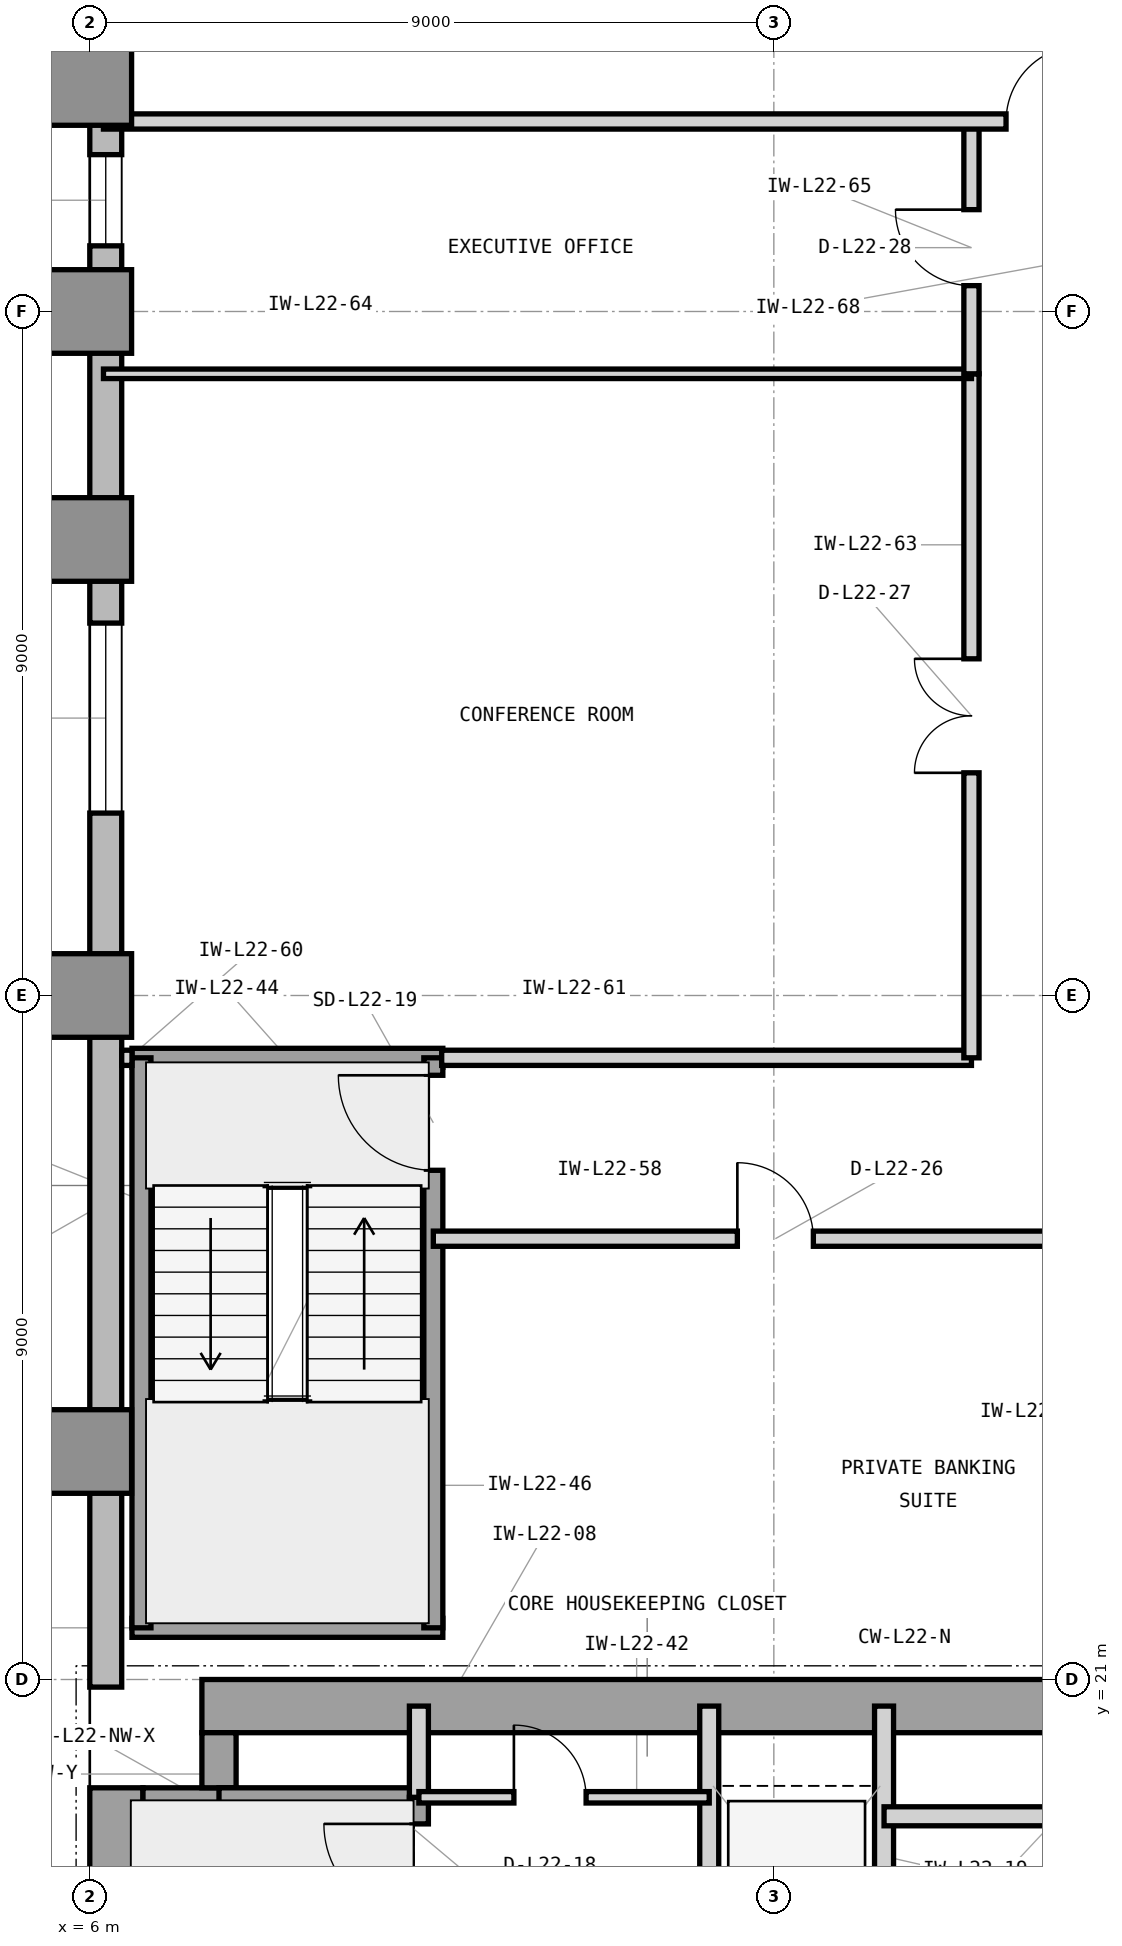
"""IFC4 building model, lengths in metres.
Left out: names, types, materials, properties, quantities, classifications, styles, units other than length and angle.
Written with IfcOpenShell. Run it as: python <this file> out.ifc"""

import sys

from ifc_helpers import new_model, si_unit, direction, frame, frame_2d, origin, origin_2d, place, context, subcontext, project, spatial, rectangle, extrude, element, fill, save


model = new_model("IFC4")
c1 = context("Model", 3, precision=1e-05, world=origin(), true_north=direction((0.0, 1.0)))
c2 = subcontext(c1, "Body", "Model", "MODEL_VIEW")
j1 = project(units=[si_unit("LENGTHUNIT", "METRE"), si_unit("PLANEANGLEUNIT", "RADIAN")], contexts=[c1])
p1 = place(None, origin())
s1 = spatial("IfcSite", under=j1, at=p1, CompositionType="ELEMENT")
p2 = place(p1, origin())
s2 = spatial("IfcBuilding", under=s1, at=p2, CompositionType="ELEMENT")
p3 = place(p2, frame((0.0, 0.0, 97.2)))
s3 = spatial("IfcBuildingStorey", under=s2, at=p3, CompositionType="ELEMENT", Elevation=97.2)
p4 = place(p3, frame((6.35, 4.425, 0.0), z_axis=(0.0, 0.0, 1.0), x_axis=(0.0, 1.0, 0.0)))
e1 = element("IfcWall", 1, at=p4, inside=s3, PredefinedType="SHEAR", context=c2, shape_type="SweptSolid", body=[
    extrude(rectangle(XDim=15.15, YDim=0.7, at=frame_2d((7.575, 0.0))), origin(), (0.0, 0.0, 1.0), 3.9),
])
p5 = place(p3, frame((7.475, 20.65, 0.0), z_axis=(0.0, 0.0, 1.0), x_axis=(1.0, 0.0, 0.0)))
e2 = element("IfcWall", 2, at=p5, inside=s3, PredefinedType="SHEAR", context=c2, shape_type="SweptSolid", body=[
    extrude(rectangle(XDim=12.325, YDim=0.7, at=frame_2d((6.163, 0.0))), origin(), (0.0, 0.0, 1.0), 3.9),
])
p6 = place(p3, frame((6.7, 19.35, 0.0), z_axis=(0.0, 0.0, 1.0), x_axis=(1.0, 0.0, 0.0)))
e3 = element("IfcWall", 3, at=p6, inside=s3, PredefinedType="SHEAR", context=c2, shape_type="SweptSolid", body=[
    extrude(rectangle(XDim=1.225, YDim=0.45, at=frame_2d((0.613, 0.0))), origin(), (0.0, 0.0, 1.0), 3.9),
])
p7 = place(p3, frame((7.7, 19.575, 0.0), z_axis=(0.0, 0.0, 1.0), x_axis=(0.0, 1.0, 0.0)))
e4 = element("IfcWall", 4, at=p7, inside=s3, PredefinedType="SHEAR", context=c2, shape_type="SweptSolid", body=[
    extrude(rectangle(XDim=0.725, YDim=0.45, at=frame_2d((0.363, 0.0))), origin(), (0.0, 0.0, 1.0), 3.9),
])
for number, where, z_axis, x_axis in (
    (5, (6.0, 24.0, 0.0), (0.0, 0.0, 1.0), (1.0, 0.0, 0.0)),
    (6, (6.0, 30.0, 0.0), (0.0, 0.0, 1.0), (1.0, 0.0, 0.0)),
    (7, (6.0, 36.0, 0.0), (0.0, 0.0, 1.0), (1.0, 0.0, 0.0)),
    (8, (6.0, 39.0, 0.0), (0.0, 0.0, 1.0), (1.0, 0.0, 0.0)),
    (9, (6.0, 42.0, 0.0), (0.0, 0.0, 1.0), (1.0, 0.0, 0.0)),
):
    element("IfcColumn", number, at=place(p3, frame(where, z_axis=z_axis, x_axis=x_axis)), inside=s3, PredefinedType="COLUMN", context=c2, shape_type="SweptSolid", body=[
        extrude(rectangle(XDim=1.1, YDim=1.1, at=origin_2d()), origin(), (0.0, 0.0, 1.0), 3.9),
    ])
p8 = place(p3, frame((6.21, 46.4, 0.0), z_axis=(0.0, 0.0, 1.0), x_axis=(0.0, -1.0, 0.0)))
e10 = element("IfcWall", 10, at=p8, inside=s3, PredefinedType="STANDARD", context=c2, shape_type="SweptSolid", body=[
    extrude(rectangle(XDim=25.5, YDim=0.42, at=frame_2d((12.75, 0.0))), origin(), (0.0, 0.0, 1.0), 3.7),
])
p9 = place(p8, frame((11.5, 0.0, 0.85)))
e11 = element("IfcOpeningElement", 11, at=p9, cuts=e10, PredefinedType="OPENING", context=c2, shape_type="SweptSolid", body=[
    extrude(rectangle(XDim=2.5, YDim=2.25, at=frame_2d((1.25, 1.125))), frame((0.0, 0.22, 0.0), z_axis=(0.0, -1.0, 0.0), x_axis=(1.0, 0.0, 0.0)), (0.0, 0.0, 1.0), 0.44),
])
p10 = place(p8, frame((5.336, 0.0, 0.85)))
e12 = element("IfcOpeningElement", 12, at=p10, cuts=e10, PredefinedType="OPENING", context=c2, shape_type="SweptSolid", body=[
    extrude(rectangle(XDim=1.2, YDim=2.25, at=frame_2d((0.6, 1.125))), frame((0.0, 0.22, 0.0), z_axis=(0.0, -1.0, 0.0), x_axis=(1.0, 0.0, 0.0)), (0.0, 0.0, 1.0), 0.44),
])
p11 = place(p3, frame((7.7, 19.45, 0.0), z_axis=(0.0, 0.0, 1.0), x_axis=(1.0, 0.0, 0.0)))
e13 = element("IfcWall", 13, at=p11, inside=s3, PredefinedType="SHEAR", context=c2, shape_type="SweptSolid", body=[
    extrude(rectangle(XDim=2.755, YDim=0.25, at=frame_2d((1.377, 0.0))), origin(), (0.0, 0.0, 1.0), 3.9),
])
p12 = place(p3, frame((10.33, 12.0, 0.0), z_axis=(0.0, 0.0, 1.0), x_axis=(0.0, 1.0, 0.0)))
e14 = element("IfcWall", 14, at=p12, inside=s3, PredefinedType="SHEAR", context=c2, shape_type="SweptSolid", body=[
    extrude(rectangle(XDim=7.45, YDim=0.25, at=frame_2d((3.725, 0.0))), origin(), (0.0, 0.0, 1.0), 3.9),
])
p13 = place(p12, frame((5.85, 0.0, 0.0)))
e15 = element("IfcOpeningElement", 15, at=p13, cuts=e14, PredefinedType="OPENING", context=c2, shape_type="SweptSolid", body=[
    extrude(rectangle(XDim=1.25, YDim=2.2, at=frame_2d((0.625, 1.1))), frame((0.0, 0.135, 0.0), z_axis=(0.0, -1.0, 0.0), x_axis=(1.0, 0.0, 0.0)), (0.0, 0.0, 1.0), 0.27),
])
p14 = place(p3, frame((10.33, 19.45, 0.0), z_axis=(0.0, 0.0, 1.0), x_axis=(0.0, 1.0, 0.0)))
e16 = element("IfcWall", 16, at=p14, inside=s3, PredefinedType="PARTITIONING", context=c2, shape_type="SweptSolid", body=[
    extrude(rectangle(XDim=1.2, YDim=0.25, at=frame_2d((0.6, 0.0))), origin(), (0.0, 0.0, 1.0), 2.917),
])
for number, where, z_axis, x_axis in (
    (17, (14.15, 16.7, 0.0), (0.0, 0.0, 1.0), (0.0, 1.0, 0.0)),
    (18, (16.45, 16.7, 0.0), (0.0, 0.0, 1.0), (0.0, 1.0, 0.0)),
):
    element("IfcWall", number, at=place(p3, frame(where, z_axis=z_axis, x_axis=x_axis)), inside=s3, PredefinedType="PARTITIONING", context=c2, shape_type="SweptSolid", body=[
        extrude(rectangle(XDim=3.95, YDim=0.25, at=frame_2d((1.975, 0.0))), origin(), (0.0, 0.0, 1.0), 3.69),
    ])
p15 = place(p3, frame((16.45, 19.2, 0.0), z_axis=(0.0, 0.0, 1.0), x_axis=(1.0, 0.0, 0.0)))
e19 = element("IfcWall", 19, at=p15, inside=s3, PredefinedType="PARTITIONING", context=c2, shape_type="SweptSolid", body=[
    extrude(rectangle(XDim=7.2, YDim=0.25, at=frame_2d((3.6, 0.0))), origin(), (0.0, 0.0, 1.0), 3.69),
])
p16 = place(p3, frame((10.33, 19.45, 0.0), z_axis=(0.0, 0.0, 1.0), x_axis=(1.0, 0.0, 0.0)))
e20 = element("IfcWall", 20, at=p16, inside=s3, PredefinedType="PARTITIONING", context=c2, shape_type="SweptSolid", body=[
    extrude(rectangle(XDim=3.82, YDim=0.15, at=frame_2d((1.91, 0.0))), origin(), (0.0, 0.0, 1.0), 3.69),
])
p17 = place(p16, frame((1.25, 0.0, 0.0)))
e21 = element("IfcOpeningElement", 21, at=p17, cuts=e20, PredefinedType="OPENING", context=c2, shape_type="SweptSolid", body=[
    extrude(rectangle(XDim=0.95, YDim=2.1, at=frame_2d((0.475, 1.05))), frame((0.0, 0.085, 0.0), z_axis=(0.0, -1.0, 0.0), x_axis=(1.0, 0.0, 0.0)), (0.0, 0.0, 1.0), 0.17),
])
for number, where, z_axis, x_axis in (
    (22, (6.555, 21.68, 0.0), (0.0, 0.0, 1.0), (1.0, 0.0, 0.0)),
    (23, (6.555, 29.18, 0.0), (0.0, 0.0, 1.0), (1.0, 0.0, 0.0)),
):
    element("IfcWall", number, at=place(p3, frame(where, z_axis=z_axis, x_axis=x_axis)), inside=s3, PredefinedType="SHEAR", context=c2, shape_type="SweptSolid", body=[
        extrude(rectangle(XDim=4.09, YDim=0.25, at=frame_2d((2.045, 0.0))), origin(), (0.0, 0.0, 1.0), 3.9),
    ])
p18 = place(p3, frame((6.68, 21.68, 0.0), z_axis=(0.0, 0.0, 1.0), x_axis=(0.0, 1.0, 0.0)))
e24 = element("IfcWall", 24, at=p18, inside=s3, PredefinedType="SHEAR", context=c2, shape_type="SweptSolid", body=[
    extrude(rectangle(XDim=7.5, YDim=0.25, at=frame_2d((3.75, 0.0))), origin(), (0.0, 0.0, 1.0), 3.9),
])
p19 = place(p3, frame((10.52, 21.68, 0.0), z_axis=(0.0, 0.0, 1.0), x_axis=(0.0, 1.0, 0.0)))
e25 = element("IfcWall", 25, at=p19, inside=s3, PredefinedType="SHEAR", context=c2, shape_type="SweptSolid", body=[
    extrude(rectangle(XDim=7.5, YDim=0.25, at=frame_2d((3.75, 0.0))), origin(), (0.0, 0.0, 1.0), 3.9),
])
p20 = place(p19, frame((6.02, 0.0, 0.0)))
e26 = element("IfcOpeningElement", 26, at=p20, cuts=e25, PredefinedType="OPENING", context=c2, shape_type="SweptSolid", body=[
    extrude(rectangle(XDim=1.25, YDim=2.2, at=frame_2d((0.625, 1.1))), frame((0.0, 0.135, 0.0), z_axis=(0.0, -1.0, 0.0), x_axis=(1.0, 0.0, 0.0)), (0.0, 0.0, 1.0), 0.27),
])
p21 = place(p3, frame((10.52, 26.8, 0.0), z_axis=(0.0, 0.0, 1.0), x_axis=(1.0, 0.0, 0.0)))
e27 = element("IfcWall", 27, at=p21, inside=s3, PredefinedType="PARTITIONING", context=c2, shape_type="SweptSolid", body=[
    extrude(rectangle(XDim=9.28, YDim=0.2, at=frame_2d((4.64, 0.0))), origin(), (0.0, 0.0, 1.0), 3.69),
])
p22 = place(p21, frame((4.0, 0.0, 0.0)))
e28 = element("IfcOpeningElement", 28, at=p22, cuts=e27, PredefinedType="OPENING", context=c2, shape_type="SweptSolid", body=[
    extrude(rectangle(XDim=1.0, YDim=2.15, at=frame_2d((0.5, 1.075))), frame((0.0, 0.11, 0.0), z_axis=(0.0, -1.0, 0.0), x_axis=(1.0, 0.0, 0.0)), (0.0, 0.0, 1.0), 0.22),
])
p23 = place(p3, frame((6.42, 29.18, 0.0), z_axis=(0.0, 0.0, 1.0), x_axis=(1.0, 0.0, 0.0)))
e29 = element("IfcWall", 29, at=p23, inside=s3, PredefinedType="PARTITIONING", context=c2, shape_type="SweptSolid", body=[
    extrude(rectangle(XDim=0.135, YDim=0.2, at=frame_2d((0.067, 0.0))), origin(), (0.0, 0.0, 1.0), 3.69),
])
p24 = place(p3, frame((10.63, 29.18, 0.0), z_axis=(0.0, 0.0, 1.0), x_axis=(1.0, 0.0, 0.0)))
e30 = element("IfcWall", 30, at=p24, inside=s3, PredefinedType="PARTITIONING", context=c2, shape_type="SweptSolid", body=[
    extrude(rectangle(XDim=6.97, YDim=0.2, at=frame_2d((3.485, 0.0))), origin(), (0.0, 0.0, 1.0), 3.69),
])
p25 = place(p3, frame((17.6, 29.18, 0.0), z_axis=(0.0, 0.0, 1.0), x_axis=(0.0, 1.0, 0.0)))
e31 = element("IfcWall", 31, at=p25, inside=s3, PredefinedType="PARTITIONING", context=c2, shape_type="SweptSolid", body=[
    extrude(rectangle(XDim=9.0, YDim=0.2, at=frame_2d((4.5, 0.0))), origin(), (0.0, 0.0, 1.0), 3.69),
])
p26 = place(p25, frame((3.75, 0.0, 0.0)))
e32 = element("IfcOpeningElement", 32, at=p26, cuts=e31, PredefinedType="OPENING", context=c2, shape_type="SweptSolid", body=[
    extrude(rectangle(XDim=1.5, YDim=2.3, at=frame_2d((0.75, 1.15))), frame((0.0, 0.11, 0.0), z_axis=(0.0, -1.0, 0.0), x_axis=(1.0, 0.0, 0.0)), (0.0, 0.0, 1.0), 0.22),
])
p27 = place(p3, frame((6.18, 38.18, 0.0), z_axis=(0.0, 0.0, 1.0), x_axis=(1.0, 0.0, 0.0)))
e33 = element("IfcWall", 33, at=p27, inside=s3, PredefinedType="PARTITIONING", context=c2, shape_type="SweptSolid", body=[
    extrude(rectangle(XDim=11.42, YDim=0.125, at=frame_2d((5.71, 0.0))), origin(), (0.0, 0.0, 1.0), 3.69),
])
p28 = place(p3, frame((17.6, 38.18, 0.0), z_axis=(0.0, 0.0, 1.0), x_axis=(0.0, 1.0, 0.0)))
e34 = element("IfcWall", 34, at=p28, inside=s3, PredefinedType="PARTITIONING", context=c2, shape_type="SweptSolid", body=[
    extrude(rectangle(XDim=3.32, YDim=0.2, at=frame_2d((1.66, 0.0))), origin(), (0.0, 0.0, 1.0), 3.69),
])
p29 = place(p28, frame((1.16, 0.0, 0.0)))
e35 = element("IfcOpeningElement", 35, at=p29, cuts=e34, PredefinedType="OPENING", context=c2, shape_type="SweptSolid", body=[
    extrude(rectangle(XDim=1.0, YDim=2.15, at=frame_2d((0.5, 1.075))), frame((0.0, 0.11, 0.0), z_axis=(0.0, -1.0, 0.0), x_axis=(1.0, 0.0, 0.0)), (0.0, 0.0, 1.0), 0.22),
])
p30 = place(p3, frame((6.18, 41.5, 0.0), z_axis=(0.0, 0.0, 1.0), x_axis=(1.0, 0.0, 0.0)))
e36 = element("IfcWall", 36, at=p30, inside=s3, PredefinedType="PARTITIONING", context=c2, shape_type="SweptSolid", body=[
    extrude(rectangle(XDim=17.64, YDim=0.2, at=frame_2d((8.82, 0.0))), origin(), (0.0, 0.0, 1.0), 3.69),
])
p31 = place(p30, frame((11.875, 0.0, 0.0)))
e37 = element("IfcOpeningElement", 37, at=p31, cuts=e36, PredefinedType="OPENING", context=c2, shape_type="SweptSolid", body=[
    extrude(rectangle(XDim=1.0, YDim=2.15, at=frame_2d((0.5, 1.075))), frame((0.0, 0.11, 0.0), z_axis=(0.0, -1.0, 0.0), x_axis=(1.0, 0.0, 0.0)), (0.0, 0.0, 1.0), 0.22),
])
p32 = place(p9, origin())
e38 = element("IfcWindow", 38, at=p32, inside=s3, PartitioningType="SINGLE_PANEL", PredefinedType="WINDOW", context=c2, shape_type="SweptSolid", body=[
    extrude(rectangle(XDim=2.5, YDim=2.25, at=frame_2d((1.25, 1.125))), frame((0.0, 0.11, 0.0), z_axis=(0.0, -1.0, 0.0), x_axis=(1.0, 0.0, 0.0)), (0.0, 0.0, 1.0), 0.06),
])
fill(e11, e38)
p33 = place(p13, origin())
e39 = element("IfcDoor", 39, at=p33, inside=s3, OperationType="SINGLE_SWING_RIGHT", PredefinedType="DOOR", context=c2, shape_type="SweptSolid", body=[
    extrude(rectangle(XDim=1.25, YDim=2.2, at=frame_2d((0.625, 1.1))), frame((0.0, 0.025, 0.0), z_axis=(0.0, -1.0, 0.0), x_axis=(1.0, 0.0, 0.0)), (0.0, 0.0, 1.0), 0.05),
])
fill(e15, e39)
p34 = place(p17, origin())
e40 = element("IfcDoor", 40, at=p34, inside=s3, OperationType="SINGLE_SWING_LEFT", PredefinedType="DOOR", context=c2, shape_type="SweptSolid", body=[
    extrude(rectangle(XDim=0.95, YDim=2.1, at=frame_2d((0.475, 1.05))), frame((0.0, 0.025, 0.0), z_axis=(0.0, -1.0, 0.0), x_axis=(1.0, 0.0, 0.0)), (0.0, 0.0, 1.0), 0.05),
])
fill(e21, e40)
p35 = place(p20, origin())
e41 = element("IfcDoor", 41, at=p35, inside=s3, OperationType="SINGLE_SWING_RIGHT", PredefinedType="DOOR", context=c2, shape_type="SweptSolid", body=[
    extrude(rectangle(XDim=1.25, YDim=2.2, at=frame_2d((0.625, 1.1))), frame((0.0, 0.025, 0.0), z_axis=(0.0, -1.0, 0.0), x_axis=(1.0, 0.0, 0.0)), (0.0, 0.0, 1.0), 0.05),
])
fill(e26, e41)
p36 = place(p22, origin())
e42 = element("IfcDoor", 42, at=p36, inside=s3, OperationType="SINGLE_SWING_LEFT", PredefinedType="DOOR", context=c2, shape_type="SweptSolid", body=[
    extrude(rectangle(XDim=1.0, YDim=2.15, at=frame_2d((0.5, 1.075))), frame((0.0, 0.025, 0.0), z_axis=(0.0, -1.0, 0.0), x_axis=(1.0, 0.0, 0.0)), (0.0, 0.0, 1.0), 0.05),
])
fill(e28, e42)
p37 = place(p26, origin())
e43 = element("IfcDoor", 43, at=p37, inside=s3, OperationType="DOUBLE_DOOR_SINGLE_SWING", PredefinedType="DOOR", context=c2, shape_type="SweptSolid", body=[
    extrude(rectangle(XDim=1.5, YDim=2.3, at=frame_2d((0.75, 1.15))), frame((0.0, 0.025, 0.0), z_axis=(0.0, -1.0, 0.0), x_axis=(1.0, 0.0, 0.0)), (0.0, 0.0, 1.0), 0.05),
])
fill(e32, e43)
p38 = place(p29, origin())
e44 = element("IfcDoor", 44, at=p38, inside=s3, OperationType="SINGLE_SWING_RIGHT", PredefinedType="DOOR", context=c2, shape_type="SweptSolid", body=[
    extrude(rectangle(XDim=1.0, YDim=2.15, at=frame_2d((0.5, 1.075))), frame((0.0, 0.025, 0.0), z_axis=(0.0, -1.0, 0.0), x_axis=(1.0, 0.0, 0.0)), (0.0, 0.0, 1.0), 0.05),
])
fill(e35, e44)
p39 = place(p31, origin())
e45 = element("IfcDoor", 45, at=p39, inside=s3, OperationType="SINGLE_SWING_RIGHT", PredefinedType="DOOR", context=c2, shape_type="SweptSolid", body=[
    extrude(rectangle(XDim=1.0, YDim=2.15, at=frame_2d((0.5, 1.075))), frame((0.0, 0.025, 0.0), z_axis=(0.0, -1.0, 0.0), x_axis=(1.0, 0.0, 0.0)), (0.0, 0.0, 1.0), 0.05),
])
fill(e37, e45)
p40 = place(p10, origin())
e46 = element("IfcWindow", 46, at=p40, inside=s3, PartitioningType="SINGLE_PANEL", PredefinedType="WINDOW", context=c2, shape_type="SweptSolid", body=[
    extrude(rectangle(XDim=1.2, YDim=2.25, at=frame_2d((0.6, 1.125))), frame((0.0, 0.11, 0.0), z_axis=(0.0, -1.0, 0.0), x_axis=(1.0, 0.0, 0.0)), (0.0, 0.0, 1.0), 0.06),
])
fill(e12, e46)
save(model, sys.argv[1])
